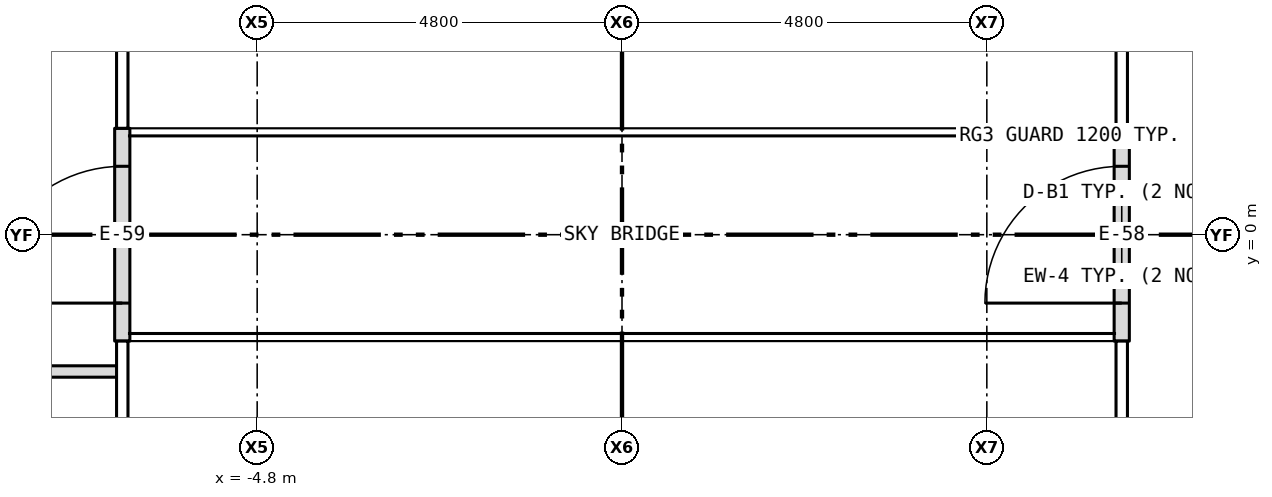
"""IFC4 building model, lengths in metres.
Left out: names, types, materials, properties, quantities, classifications, styles, units other than length and angle.
Written with IfcOpenShell. Run it as: python <this file> out.ifc"""

import sys

from ifc_helpers import new_model, si_unit, direction, frame, frame_2d, origin, place, context, subcontext, project, spatial, rectangle, extrude, element, fill, save


model = new_model("IFC4")
c1 = context("Model", 3, precision=1e-05, world=origin(), true_north=direction((0.0, 1.0)))
c2 = subcontext(c1, "Body", "Model", "MODEL_VIEW")
j1 = project(units=[si_unit("LENGTHUNIT", "METRE"), si_unit("PLANEANGLEUNIT", "RADIAN")], contexts=[c1])
p1 = place(None, origin())
s1 = spatial("IfcSite", under=j1, at=p1, CompositionType="ELEMENT")
p2 = place(p1, origin())
s2 = spatial("IfcBuilding", under=s1, at=p2, CompositionType="ELEMENT")
p3 = place(p2, frame((0.0, 0.0, 222.5)))
s3 = spatial("IfcBuildingStorey", under=s2, at=p3, CompositionType="ELEMENT", Elevation=222.5)
p4 = place(p3, frame((6.575, -1.4, 0.0), z_axis=(0.0, 0.0, 1.0), x_axis=(0.0, 1.0, 0.0)))
e1 = element("IfcWall", 1, at=p4, inside=s3, PredefinedType="SOLIDWALL", context=c2, shape_type="SweptSolid", body=[
    extrude(rectangle(XDim=2.8, YDim=0.2, at=frame_2d((1.4, 0.0))), origin(), (0.0, 0.0, 1.0), 3.5),
])
p5 = place(p4, frame((0.5, 0.0, 0.0)))
e2 = element("IfcOpeningElement", 2, at=p5, cuts=e1, PredefinedType="OPENING", context=c2, shape_type="SweptSolid", body=[
    extrude(rectangle(XDim=1.8, YDim=2.1, at=frame_2d((0.9, 1.05))), frame((0.0, 0.112, 0.0), z_axis=(0.0, -1.0, 0.0), x_axis=(1.0, 0.0, 0.0)), (0.0, 0.0, 1.0), 0.224),
])
p6 = place(p3, frame((-6.575, -1.4, 0.0), z_axis=(0.0, 0.0, 1.0), x_axis=(0.0, 1.0, 0.0)))
e3 = element("IfcWall", 3, at=p6, inside=s3, PredefinedType="SOLIDWALL", context=c2, shape_type="SweptSolid", body=[
    extrude(rectangle(XDim=2.8, YDim=0.2, at=frame_2d((1.4, 0.0))), origin(), (0.0, 0.0, 1.0), 3.5),
])
p7 = place(p6, frame((0.5, 0.0, 0.0)))
e4 = element("IfcOpeningElement", 4, at=p7, cuts=e3, PredefinedType="OPENING", context=c2, shape_type="SweptSolid", body=[
    extrude(rectangle(XDim=1.8, YDim=2.1, at=frame_2d((0.9, 1.05))), frame((0.0, 0.112, 0.0), z_axis=(0.0, -1.0, 0.0), x_axis=(1.0, 0.0, 0.0)), (0.0, 0.0, 1.0), 0.224),
])
p8 = place(p3, frame((-12.4, -1.8, 0.0), z_axis=(0.0, 0.0, 1.0), x_axis=(1.0, 0.0, 0.0)))
e5 = element("IfcWall", 5, at=p8, inside=s3, PredefinedType="PARTITIONING", context=c2, shape_type="SweptSolid", body=[
    extrude(rectangle(XDim=5.78, YDim=0.15, at=frame_2d((2.89, 0.0))), origin(), (0.0, 0.0, 1.0), 3.35),
])
p9 = place(p5, origin())
e6 = element("IfcDoor", 6, at=p9, inside=s3, OperationType="DOUBLE_DOOR_DOUBLE_SWING", PredefinedType="DOOR", context=c2, shape_type="SweptSolid", body=[
    extrude(rectangle(XDim=1.8, YDim=2.1, at=frame_2d((0.9, 1.05))), frame((0.0, 0.025, 0.0), z_axis=(0.0, -1.0, 0.0), x_axis=(1.0, 0.0, 0.0)), (0.0, 0.0, 1.0), 0.05),
])
fill(e2, e6)
p10 = place(p7, origin())
e7 = element("IfcDoor", 7, at=p10, inside=s3, OperationType="DOUBLE_DOOR_DOUBLE_SWING", PredefinedType="DOOR", context=c2, shape_type="SweptSolid", body=[
    extrude(rectangle(XDim=1.8, YDim=2.1, at=frame_2d((0.9, 1.05))), frame((0.0, 0.025, 0.0), z_axis=(0.0, -1.0, 0.0), x_axis=(1.0, 0.0, 0.0)), (0.0, 0.0, 1.0), 0.05),
])
fill(e4, e7)
save(model, sys.argv[1])
